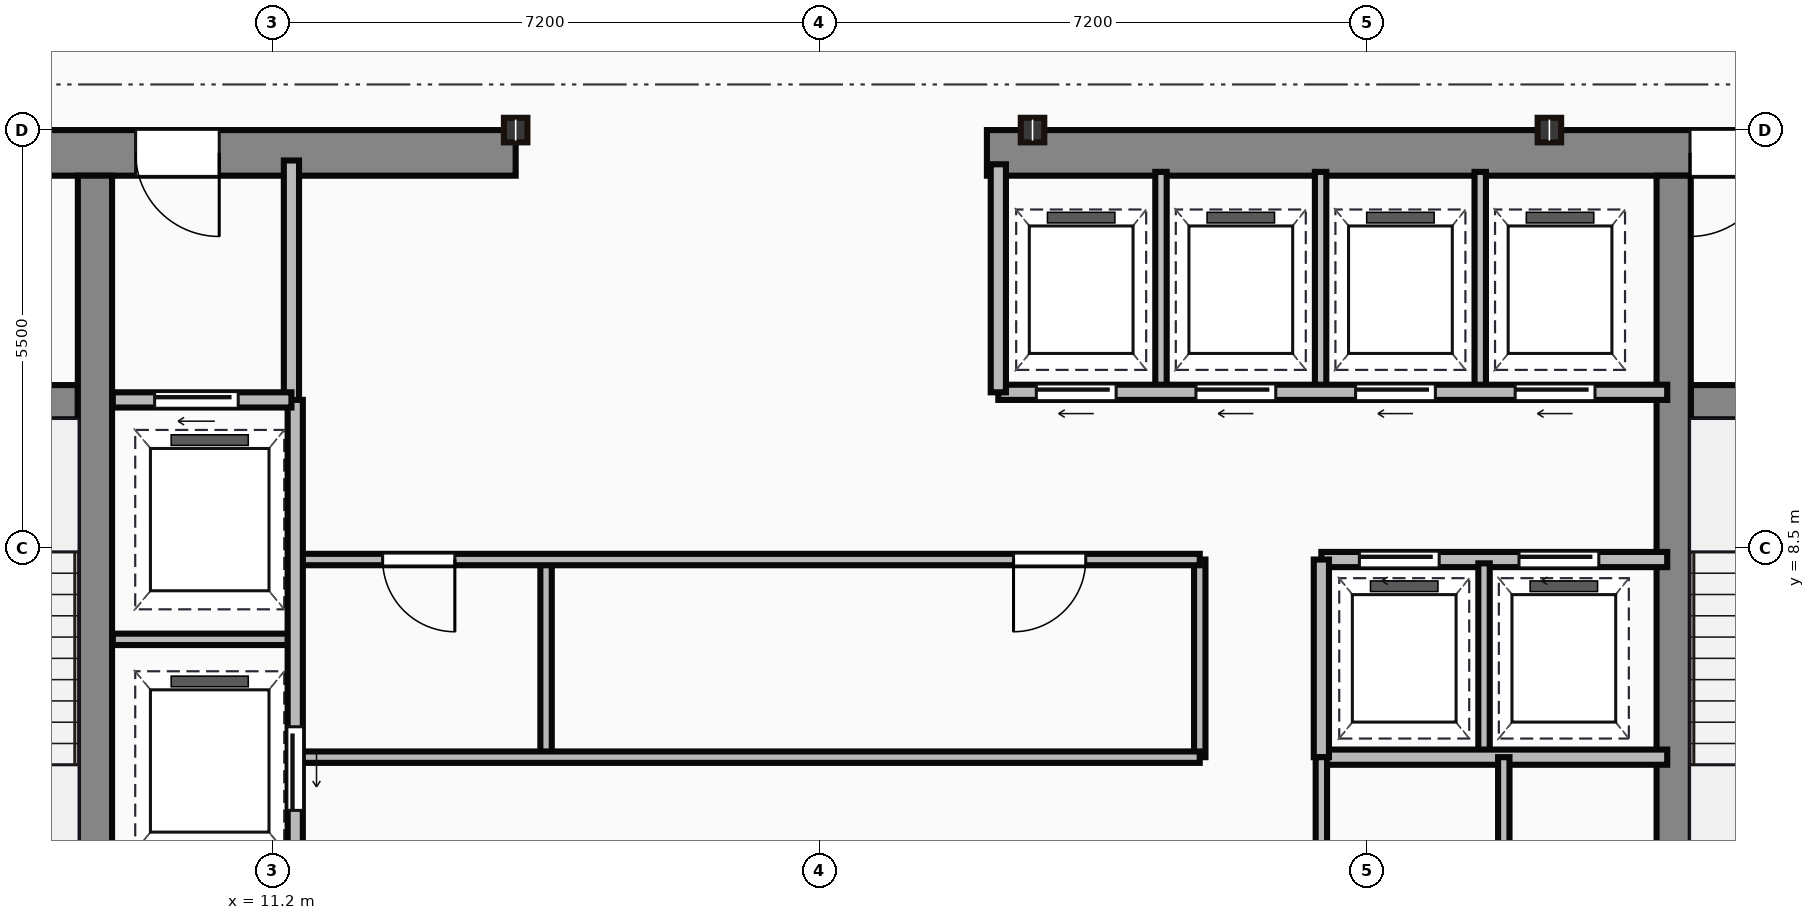
"""IFC4 building model, lengths in metres.
Left out: names, types, materials, properties, quantities, classifications, styles, units other than length and angle.
Written with IfcOpenShell. Run it as: python <this file> out.ifc"""

import sys

from ifc_helpers import new_model, si_unit, direction, frame, frame_2d, origin, origin_2d, place, context, subcontext, project, spatial, rectangle, i_section, extrude, source, transform, mapped, element, fill, save


model = new_model("IFC4")
c1 = context("Model", 3, precision=1e-05, world=origin(), true_north=direction((0.0, 1.0)))
c2 = subcontext(c1, "Body", "Model", "MODEL_VIEW")
j1 = project(units=[si_unit("LENGTHUNIT", "METRE"), si_unit("PLANEANGLEUNIT", "RADIAN")], contexts=[c1])
p1 = place(None, origin())
s1 = spatial("IfcSite", under=j1, at=p1, CompositionType="ELEMENT")
p2 = place(p1, origin())
s2 = spatial("IfcBuilding", under=s1, at=p2, CompositionType="ELEMENT")
p3 = place(p2, frame((0.0, 0.0, 284.35)))
s3 = spatial("IfcBuildingStorey", under=s2, at=p3, CompositionType="ELEMENT", Elevation=284.35)
m1 = source(origin(), c2, "Body", "SweptSolid", [
    extrude(rectangle(XDim=9.1, YDim=0.6, at=frame_2d((4.55, 0.0))), origin(), (0.0, 0.0, 1.0), 3.65),
])
p4 = place(p3, frame((5.3, 13.7, 0.0), z_axis=(0.0, 0.0, 1.0), x_axis=(1.0, 0.0, 0.0)))
e1 = element("IfcWall", 1, at=p4, inside=s3, PredefinedType="SHEAR", context=c2, shape_type="MappedRepresentation", body=[
    mapped(m1, transform((0.0, 0.0, 0.0))),
])
p5 = place(p4, frame((4.1, 0.0, 0.0)))
e2 = element("IfcOpeningElement", 2, at=p5, cuts=e1, PredefinedType="OPENING", context=c2, shape_type="SweptSolid", body=[
    extrude(rectangle(XDim=1.1, YDim=2.15, at=frame_2d((0.55, 1.075))), frame((0.0, 0.31, 0.0), z_axis=(0.0, -1.0, 0.0), x_axis=(1.0, 0.0, 0.0)), (0.0, 0.0, 1.0), 0.62),
])
m2 = source(origin(), c2, "Body", "SweptSolid", [
    extrude(rectangle(XDim=12.6, YDim=0.6, at=frame_2d((6.3, 0.0))), origin(), (0.0, 0.0, 1.0), 3.65),
])
p6 = place(p3, frame((20.6, 13.7, 0.0), z_axis=(0.0, 0.0, 1.0), x_axis=(1.0, 0.0, 0.0)))
e3 = element("IfcWall", 3, at=p6, inside=s3, PredefinedType="SHEAR", context=c2, shape_type="MappedRepresentation", body=[
    mapped(m2, transform((0.0, 0.0, 0.0))),
])
p7 = place(p6, frame((9.25, 0.0, 0.0)))
e4 = element("IfcOpeningElement", 4, at=p7, cuts=e3, PredefinedType="OPENING", context=c2, shape_type="SweptSolid", body=[
    extrude(rectangle(XDim=1.1, YDim=2.15, at=frame_2d((0.55, 1.075))), frame((0.0, 0.31, 0.0), z_axis=(0.0, -1.0, 0.0), x_axis=(1.0, 0.0, 0.0)), (0.0, 0.0, 1.0), 0.62),
])
m3 = source(origin(), c2, "Body", "SweptSolid", [
    extrude(rectangle(XDim=12.5, YDim=0.45, at=frame_2d((6.25, 0.0))), origin(), (0.0, 0.0, 1.0), 3.65),
])
for number, where, z_axis, x_axis in (
    (5, (8.865, 0.9, 0.0), (0.0, 0.0, 1.0), (0.0, 1.0, 0.0)),
    (6, (29.635, 0.9, 0.0), (0.0, 0.0, 1.0), (0.0, 1.0, 0.0)),
):
    element("IfcWall", number, at=place(p3, frame(where, z_axis=z_axis, x_axis=x_axis)), inside=s3, PredefinedType="SHEAR", context=c2, shape_type="MappedRepresentation", body=[
        mapped(m3, transform((0.0, 0.0, 0.0))),
    ])
m4 = source(origin(), c2, "Body", "SweptSolid", [
    extrude(rectangle(XDim=3.39, YDim=0.45, at=frame_2d((1.695, 0.0))), origin(), (0.0, 0.0, 1.0), 3.65),
])
p8 = place(p3, frame((5.25, 10.42, 0.0), z_axis=(0.0, 0.0, 1.0), x_axis=(1.0, 0.0, 0.0)))
e7 = element("IfcWall", 7, at=p8, inside=s3, PredefinedType="SHEAR", context=c2, shape_type="MappedRepresentation", body=[
    mapped(m4, transform((0.0, 0.0, 0.0))),
])
p9 = place(p8, frame((1.05, 0.0, 0.0)))
e8 = element("IfcOpeningElement", 8, at=p9, cuts=e7, PredefinedType="OPENING", context=c2, shape_type="SweptSolid", body=[
    extrude(rectangle(XDim=1.1, YDim=2.15, at=frame_2d((0.55, 1.075))), frame((0.0, 0.235, 0.0), z_axis=(0.0, -1.0, 0.0), x_axis=(1.0, 0.0, 0.0)), (0.0, 0.0, 1.0), 0.47),
])
p10 = place(p3, frame((29.86, 10.42, 0.0), z_axis=(0.0, 0.0, 1.0), x_axis=(1.0, 0.0, 0.0)))
e9 = element("IfcWall", 9, at=p10, inside=s3, PredefinedType="SHEAR", context=c2, shape_type="MappedRepresentation", body=[
    mapped(m4, transform((0.0, 0.0, 0.0))),
])
p11 = place(p10, frame((1.1, 0.0, 0.0)))
e10 = element("IfcOpeningElement", 10, at=p11, cuts=e9, PredefinedType="OPENING", context=c2, shape_type="SweptSolid", body=[
    extrude(rectangle(XDim=1.1, YDim=2.15, at=frame_2d((0.55, 1.075))), frame((0.0, 0.235, 0.0), z_axis=(0.0, -1.0, 0.0), x_axis=(1.0, 0.0, 0.0)), (0.0, 0.0, 1.0), 0.47),
])
m5 = source(origin(), c2, "Body", "SweptSolid", [
    extrude(i_section(OverallWidth=0.309, OverallDepth=0.323, WebThickness=0.014, FlangeThickness=0.023, at=origin_2d()), origin(), (0.0, 0.0, 1.0), 3.65),
])
for number, where, z_axis, x_axis in (
    (11, (14.4, 14.0, 0.0), (0.0, 0.0, 1.0), (1.0, 0.0, 0.0)),
    (12, (21.2, 14.0, 0.0), (0.0, 0.0, 1.0), (1.0, 0.0, 0.0)),
    (13, (28.0, 14.0, 0.0), (0.0, 0.0, 1.0), (1.0, 0.0, 0.0)),
):
    element("IfcColumn", number, at=place(p3, frame(where, z_axis=z_axis, x_axis=x_axis)), inside=s3, PredefinedType="COLUMN", context=c2, shape_type="MappedRepresentation", body=[
        mapped(m5, transform((0.0, 0.0, 0.0))),
    ])
m6 = source(origin(), c2, "Body", "SweptSolid", [
    extrude(rectangle(XDim=3.18, YDim=0.2, at=frame_2d((1.59, 0.0))), origin(), (0.0, 0.0, 1.0), 3.4),
])
p12 = place(p3, frame((11.45, 10.42, 0.0), z_axis=(0.0, 0.0, 1.0), x_axis=(0.0, 1.0, 0.0)))
e14 = element("IfcWall", 14, at=p12, inside=s3, PredefinedType="PARTITIONING", context=c2, shape_type="MappedRepresentation", body=[
    mapped(m6, transform((0.0, 0.0, 0.0))),
])
m7 = source(origin(), c2, "Body", "SweptSolid", [
    extrude(rectangle(XDim=2.35, YDim=0.2, at=frame_2d((1.175, 0.0))), origin(), (0.0, 0.0, 1.0), 3.4),
])
p13 = place(p3, frame((9.1, 10.45, 0.0), z_axis=(0.0, 0.0, 1.0), x_axis=(1.0, 0.0, 0.0)))
e15 = element("IfcWall", 15, at=p13, inside=s3, PredefinedType="PARTITIONING", context=c2, shape_type="MappedRepresentation", body=[
    mapped(m7, transform((0.0, 0.0, 0.0))),
])
p14 = place(p13, frame((0.55, 0.0, 0.0)))
e16 = element("IfcOpeningElement", 16, at=p14, cuts=e15, PredefinedType="OPENING", context=c2, shape_type="SweptSolid", body=[
    extrude(rectangle(XDim=1.1, YDim=2.15, at=frame_2d((0.55, 1.075))), frame((0.0, 0.11, 0.0), z_axis=(0.0, -1.0, 0.0), x_axis=(1.0, 0.0, 0.0)), (0.0, 0.0, 1.0), 0.22),
])
m8 = source(origin(), c2, "Body", "SweptSolid", [
    extrude(rectangle(XDim=9.6, YDim=0.2, at=frame_2d((4.8, 0.0))), origin(), (0.0, 0.0, 1.0), 3.4),
])
p15 = place(p3, frame((11.5, 0.85, 0.0), z_axis=(0.0, 0.0, 1.0), x_axis=(0.0, 1.0, 0.0)))
e17 = element("IfcWall", 17, at=p15, inside=s3, PredefinedType="PARTITIONING", context=c2, shape_type="MappedRepresentation", body=[
    mapped(m8, transform((0.0, 0.0, 0.0))),
])
p16 = place(p15, frame((4.2, 0.0, 0.0)))
e18 = element("IfcOpeningElement", 18, at=p16, cuts=e17, PredefinedType="OPENING", context=c2, shape_type="SweptSolid", body=[
    extrude(rectangle(XDim=1.1, YDim=2.15, at=frame_2d((0.55, 1.075))), frame((0.0, 0.11, 0.0), z_axis=(0.0, -1.0, 0.0), x_axis=(1.0, 0.0, 0.0)), (0.0, 0.0, 1.0), 0.22),
])
p17 = place(p15, frame((0.9, 0.0, 0.0)))
e19 = element("IfcOpeningElement", 19, at=p17, cuts=e17, PredefinedType="OPENING", context=c2, shape_type="SweptSolid", body=[
    extrude(rectangle(XDim=1.2, YDim=2.15, at=frame_2d((0.6, 1.075))), frame((0.0, 0.11, 0.0), z_axis=(0.0, -1.0, 0.0), x_axis=(1.0, 0.0, 0.0)), (0.0, 0.0, 1.0), 0.22),
])
m9 = source(origin(), c2, "Body", "SweptSolid", [
    extrude(rectangle(XDim=2.4, YDim=0.15, at=frame_2d((1.2, 0.0))), origin(), (0.0, 0.0, 1.0), 3.4),
])
p18 = place(p3, frame((9.1, 7.3, 0.0), z_axis=(0.0, 0.0, 1.0), x_axis=(1.0, 0.0, 0.0)))
e20 = element("IfcWall", 20, at=p18, inside=s3, PredefinedType="PARTITIONING", context=c2, shape_type="MappedRepresentation", body=[
    mapped(m9, transform((0.0, 0.0, 0.0))),
])
m10 = source(origin(), c2, "Body", "SweptSolid", [
    extrude(rectangle(XDim=11.85, YDim=0.15, at=frame_2d((5.925, 0.0))), origin(), (0.0, 0.0, 1.0), 3.4),
])
p19 = place(p3, frame((11.55, 5.75, 0.0), z_axis=(0.0, 0.0, 1.0), x_axis=(1.0, 0.0, 0.0)))
e21 = element("IfcWall", 21, at=p19, inside=s3, PredefinedType="PARTITIONING", context=c2, shape_type="MappedRepresentation", body=[
    mapped(m10, transform((0.0, 0.0, 0.0))),
])
p20 = place(p3, frame((11.55, 8.35, 0.0), z_axis=(0.0, 0.0, 1.0), x_axis=(1.0, 0.0, 0.0)))
e22 = element("IfcWall", 22, at=p20, inside=s3, PredefinedType="PARTITIONING", context=c2, shape_type="MappedRepresentation", body=[
    mapped(m10, transform((0.0, 0.0, 0.0))),
])
p21 = place(p20, frame((1.1, 0.0, 0.0)))
e23 = element("IfcOpeningElement", 23, at=p21, cuts=e22, PredefinedType="OPENING", context=c2, shape_type="SweptSolid", body=[
    extrude(rectangle(XDim=0.95, YDim=2.15, at=frame_2d((0.475, 1.075))), frame((0.0, 0.085, 0.0), z_axis=(0.0, -1.0, 0.0), x_axis=(1.0, 0.0, 0.0)), (0.0, 0.0, 1.0), 0.17),
])
p22 = place(p20, frame((9.4, 0.0, 0.0)))
e24 = element("IfcOpeningElement", 24, at=p22, cuts=e22, PredefinedType="OPENING", context=c2, shape_type="SweptSolid", body=[
    extrude(rectangle(XDim=0.95, YDim=2.15, at=frame_2d((0.475, 1.075))), frame((0.0, 0.085, 0.0), z_axis=(0.0, -1.0, 0.0), x_axis=(1.0, 0.0, 0.0)), (0.0, 0.0, 1.0), 0.17),
])
m11 = source(origin(), c2, "Body", "SweptSolid", [
    extrude(rectangle(XDim=2.6, YDim=0.15, at=frame_2d((1.3, 0.0))), origin(), (0.0, 0.0, 1.0), 3.4),
])
p23 = place(p3, frame((23.4, 5.75, 0.0), z_axis=(0.0, 0.0, 1.0), x_axis=(0.0, 1.0, 0.0)))
e25 = element("IfcWall", 25, at=p23, inside=s3, PredefinedType="PARTITIONING", context=c2, shape_type="MappedRepresentation", body=[
    mapped(m11, transform((0.0, 0.0, 0.0))),
])
m12 = source(origin(), c2, "Body", "SweptSolid", [
    extrude(rectangle(XDim=2.5, YDim=0.15, at=frame_2d((1.25, 0.0))), origin(), (0.0, 0.0, 1.0), 3.4),
])
p24 = place(p3, frame((14.8, 5.8, 0.0), z_axis=(0.0, 0.0, 1.0), x_axis=(0.0, 1.0, 0.0)))
e26 = element("IfcWall", 26, at=p24, inside=s3, PredefinedType="PARTITIONING", context=c2, shape_type="MappedRepresentation", body=[
    mapped(m12, transform((0.0, 0.0, 0.0))),
])
m13 = source(origin(), c2, "Body", "SweptSolid", [
    extrude(rectangle(XDim=8.8, YDim=0.2, at=frame_2d((4.4, 0.0))), origin(), (0.0, 0.0, 1.0), 3.4),
])
p25 = place(p3, frame((20.75, 10.55, 0.0), z_axis=(0.0, 0.0, 1.0), x_axis=(1.0, 0.0, 0.0)))
e27 = element("IfcWall", 27, at=p25, inside=s3, PredefinedType="PARTITIONING", context=c2, shape_type="MappedRepresentation", body=[
    mapped(m13, transform((0.0, 0.0, 0.0))),
])
p26 = place(p25, frame((0.5, 0.0, 0.0)))
e28 = element("IfcOpeningElement", 28, at=p26, cuts=e27, PredefinedType="OPENING", context=c2, shape_type="SweptSolid", body=[
    extrude(rectangle(XDim=1.05, YDim=2.15, at=frame_2d((0.525, 1.075))), frame((0.0, 0.11, 0.0), z_axis=(0.0, -1.0, 0.0), x_axis=(1.0, 0.0, 0.0)), (0.0, 0.0, 1.0), 0.22),
])
p27 = place(p25, frame((2.6, 0.0, 0.0)))
e29 = element("IfcOpeningElement", 29, at=p27, cuts=e27, PredefinedType="OPENING", context=c2, shape_type="SweptSolid", body=[
    extrude(rectangle(XDim=1.05, YDim=2.15, at=frame_2d((0.525, 1.075))), frame((0.0, 0.11, 0.0), z_axis=(0.0, -1.0, 0.0), x_axis=(1.0, 0.0, 0.0)), (0.0, 0.0, 1.0), 0.22),
])
p28 = place(p25, frame((4.7, 0.0, 0.0)))
e30 = element("IfcOpeningElement", 30, at=p28, cuts=e27, PredefinedType="OPENING", context=c2, shape_type="SweptSolid", body=[
    extrude(rectangle(XDim=1.05, YDim=2.15, at=frame_2d((0.525, 1.075))), frame((0.0, 0.11, 0.0), z_axis=(0.0, -1.0, 0.0), x_axis=(1.0, 0.0, 0.0)), (0.0, 0.0, 1.0), 0.22),
])
p29 = place(p25, frame((6.8, 0.0, 0.0)))
e31 = element("IfcOpeningElement", 31, at=p29, cuts=e27, PredefinedType="OPENING", context=c2, shape_type="SweptSolid", body=[
    extrude(rectangle(XDim=1.05, YDim=2.15, at=frame_2d((0.525, 1.075))), frame((0.0, 0.11, 0.0), z_axis=(0.0, -1.0, 0.0), x_axis=(1.0, 0.0, 0.0)), (0.0, 0.0, 1.0), 0.22),
])
m14 = source(origin(), c2, "Body", "SweptSolid", [
    extrude(rectangle(XDim=3.0, YDim=0.2, at=frame_2d((1.5, 0.0))), origin(), (0.0, 0.0, 1.0), 3.4),
])
p30 = place(p3, frame((20.75, 10.55, 0.0), z_axis=(0.0, 0.0, 1.0), x_axis=(0.0, 1.0, 0.0)))
e32 = element("IfcWall", 32, at=p30, inside=s3, PredefinedType="PARTITIONING", context=c2, shape_type="MappedRepresentation", body=[
    mapped(m14, transform((0.0, 0.0, 0.0))),
])
m15 = source(origin(), c2, "Body", "SweptSolid", [
    extrude(rectangle(XDim=2.85, YDim=0.15, at=frame_2d((1.425, 0.0))), origin(), (0.0, 0.0, 1.0), 3.4),
])
for number, where, z_axis, x_axis in (
    (33, (22.89, 10.6, 0.0), (0.0, 0.0, 1.0), (0.0, 1.0, 0.0)),
    (34, (24.99, 10.6, 0.0), (0.0, 0.0, 1.0), (0.0, 1.0, 0.0)),
    (35, (27.09, 10.6, 0.0), (0.0, 0.0, 1.0), (0.0, 1.0, 0.0)),
):
    element("IfcWall", number, at=place(p3, frame(where, z_axis=z_axis, x_axis=x_axis)), inside=s3, PredefinedType="PARTITIONING", context=c2, shape_type="MappedRepresentation", body=[
        mapped(m15, transform((0.0, 0.0, 0.0))),
    ])
m16 = source(origin(), c2, "Body", "SweptSolid", [
    extrude(rectangle(XDim=4.55, YDim=0.2, at=frame_2d((2.275, 0.0))), origin(), (0.0, 0.0, 1.0), 3.4),
])
p31 = place(p3, frame((25.0, 8.35, 0.0), z_axis=(0.0, 0.0, 1.0), x_axis=(1.0, 0.0, 0.0)))
e36 = element("IfcWall", 36, at=p31, inside=s3, PredefinedType="PARTITIONING", context=c2, shape_type="MappedRepresentation", body=[
    mapped(m16, transform((0.0, 0.0, 0.0))),
])
p32 = place(p31, frame((0.5, 0.0, 0.0)))
e37 = element("IfcOpeningElement", 37, at=p32, cuts=e36, PredefinedType="OPENING", context=c2, shape_type="SweptSolid", body=[
    extrude(rectangle(XDim=1.05, YDim=2.15, at=frame_2d((0.525, 1.075))), frame((0.0, 0.11, 0.0), z_axis=(0.0, -1.0, 0.0), x_axis=(1.0, 0.0, 0.0)), (0.0, 0.0, 1.0), 0.22),
])
p33 = place(p31, frame((2.6, 0.0, 0.0)))
e38 = element("IfcOpeningElement", 38, at=p33, cuts=e36, PredefinedType="OPENING", context=c2, shape_type="SweptSolid", body=[
    extrude(rectangle(XDim=1.05, YDim=2.15, at=frame_2d((0.525, 1.075))), frame((0.0, 0.11, 0.0), z_axis=(0.0, -1.0, 0.0), x_axis=(1.0, 0.0, 0.0)), (0.0, 0.0, 1.0), 0.22),
])
p34 = place(p3, frame((25.0, 5.75, 0.0), z_axis=(0.0, 0.0, 1.0), x_axis=(1.0, 0.0, 0.0)))
e39 = element("IfcWall", 39, at=p34, inside=s3, PredefinedType="PARTITIONING", context=c2, shape_type="MappedRepresentation", body=[
    mapped(m16, transform((0.0, 0.0, 0.0))),
])
m17 = source(origin(), c2, "Body", "SweptSolid", [
    extrude(rectangle(XDim=2.6, YDim=0.2, at=frame_2d((1.3, 0.0))), origin(), (0.0, 0.0, 1.0), 3.4),
])
p35 = place(p3, frame((25.0, 5.75, 0.0), z_axis=(0.0, 0.0, 1.0), x_axis=(0.0, 1.0, 0.0)))
e40 = element("IfcWall", 40, at=p35, inside=s3, PredefinedType="PARTITIONING", context=c2, shape_type="MappedRepresentation", body=[
    mapped(m17, transform((0.0, 0.0, 0.0))),
])
p36 = place(p3, frame((27.14, 5.8, 0.0), z_axis=(0.0, 0.0, 1.0), x_axis=(0.0, 1.0, 0.0)))
e41 = element("IfcWall", 41, at=p36, inside=s3, PredefinedType="PARTITIONING", context=c2, shape_type="MappedRepresentation", body=[
    mapped(m12, transform((0.0, 0.0, 0.0))),
])
m18 = source(origin(), c2, "Body", "SweptSolid", [
    extrude(rectangle(XDim=4.9, YDim=0.15, at=frame_2d((2.45, 0.0))), origin(), (0.0, 0.0, 1.0), 3.4),
])
p37 = place(p3, frame((25.0, 0.85, 0.0), z_axis=(0.0, 0.0, 1.0), x_axis=(0.0, 1.0, 0.0)))
e42 = element("IfcWall", 42, at=p37, inside=s3, PredefinedType="PARTITIONING", context=c2, shape_type="MappedRepresentation", body=[
    mapped(m18, transform((0.0, 0.0, 0.0))),
])
p38 = place(p37, frame((2.5, 0.0, 0.0)))
e43 = element("IfcOpeningElement", 43, at=p38, cuts=e42, PredefinedType="OPENING", context=c2, shape_type="SweptSolid", body=[
    extrude(rectangle(XDim=0.95, YDim=2.15, at=frame_2d((0.475, 1.075))), frame((0.0, 0.085, 0.0), z_axis=(0.0, -1.0, 0.0), x_axis=(1.0, 0.0, 0.0)), (0.0, 0.0, 1.0), 0.17),
])
m19 = source(origin(), c2, "Body", "SweptSolid", [
    extrude(rectangle(XDim=3.4, YDim=0.15, at=frame_2d((1.7, 0.0))), origin(), (0.0, 0.0, 1.0), 3.4),
])
p39 = place(p3, frame((27.4, 2.35, 0.0), z_axis=(0.0, 0.0, 1.0), x_axis=(0.0, 1.0, 0.0)))
e44 = element("IfcWall", 44, at=p39, inside=s3, PredefinedType="PARTITIONING", context=c2, shape_type="MappedRepresentation", body=[
    mapped(m19, transform((0.0, 0.0, 0.0))),
])
p40 = place(p39, frame((1.1, 0.0, 0.0)))
e45 = element("IfcOpeningElement", 45, at=p40, cuts=e44, PredefinedType="OPENING", context=c2, shape_type="SweptSolid", body=[
    extrude(rectangle(XDim=0.85, YDim=2.1, at=frame_2d((0.425, 1.05))), frame((0.0, 0.085, 0.0), z_axis=(0.0, -1.0, 0.0), x_axis=(1.0, 0.0, 0.0)), (0.0, 0.0, 1.0), 0.17),
])
m20 = source(origin(), c2, "Body", "SweptSolid", [
    extrude(rectangle(XDim=1.1, YDim=2.15, at=frame_2d((0.55, 1.075))), frame((0.0, 0.025, 0.0), z_axis=(0.0, -1.0, 0.0), x_axis=(1.0, 0.0, 0.0)), (0.0, 0.0, 1.0), 0.05),
])
p41 = place(p5, origin())
e46 = element("IfcDoor", 46, at=p41, inside=s3, OperationType="SINGLE_SWING_RIGHT", PredefinedType="DOOR", context=c2, shape_type="MappedRepresentation", body=[
    mapped(m20, transform((0.0, 0.0, 0.0))),
])
fill(e2, e46)
p42 = place(p7, origin())
e47 = element("IfcDoor", 47, at=p42, inside=s3, OperationType="SINGLE_SWING_LEFT", PredefinedType="DOOR", context=c2, shape_type="MappedRepresentation", body=[
    mapped(m20, transform((0.0, 0.0, 0.0))),
])
fill(e4, e47)
p43 = place(p14, origin())
e48 = element("IfcDoor", 48, at=p43, inside=s3, OperationType="SLIDING_TO_LEFT", PredefinedType="DOOR", context=c2, shape_type="MappedRepresentation", body=[
    mapped(m20, transform((0.0, 0.0, 0.0))),
])
fill(e16, e48)
p44 = place(p16, frame((1.1, 0.0, 0.0), z_axis=(0.0, 0.0, 1.0), x_axis=(-1.0, 0.0, 0.0)))
e49 = element("IfcDoor", 49, at=p44, inside=s3, OperationType="SLIDING_TO_LEFT", PredefinedType="DOOR", context=c2, shape_type="MappedRepresentation", body=[
    mapped(m20, transform((0.0, 0.0, 0.0))),
])
fill(e18, e49)
m21 = source(origin(), c2, "Body", "SweptSolid", [
    extrude(rectangle(XDim=0.95, YDim=2.15, at=frame_2d((0.475, 1.075))), frame((0.0, 0.025, 0.0), z_axis=(0.0, -1.0, 0.0), x_axis=(1.0, 0.0, 0.0)), (0.0, 0.0, 1.0), 0.05),
])
p45 = place(p21, origin())
e50 = element("IfcDoor", 50, at=p45, inside=s3, OperationType="SINGLE_SWING_RIGHT", PredefinedType="DOOR", context=c2, shape_type="MappedRepresentation", body=[
    mapped(m21, transform((0.0, 0.0, 0.0))),
])
fill(e23, e50)
p46 = place(p22, origin())
e51 = element("IfcDoor", 51, at=p46, inside=s3, OperationType="SINGLE_SWING_LEFT", PredefinedType="DOOR", context=c2, shape_type="MappedRepresentation", body=[
    mapped(m21, transform((0.0, 0.0, 0.0))),
])
fill(e24, e51)
m22 = source(origin(), c2, "Body", "SweptSolid", [
    extrude(rectangle(XDim=1.05, YDim=2.15, at=frame_2d((0.525, 1.075))), frame((0.0, 0.025, 0.0), z_axis=(0.0, -1.0, 0.0), x_axis=(1.0, 0.0, 0.0)), (0.0, 0.0, 1.0), 0.05),
])
p47 = place(p26, frame((1.05, 0.0, 0.0), z_axis=(0.0, 0.0, 1.0), x_axis=(-1.0, 0.0, 0.0)))
e52 = element("IfcDoor", 52, at=p47, inside=s3, OperationType="SLIDING_TO_LEFT", PredefinedType="DOOR", context=c2, shape_type="MappedRepresentation", body=[
    mapped(m22, transform((0.0, 0.0, 0.0))),
])
fill(e28, e52)
p48 = place(p27, frame((1.05, 0.0, 0.0), z_axis=(0.0, 0.0, 1.0), x_axis=(-1.0, 0.0, 0.0)))
e53 = element("IfcDoor", 53, at=p48, inside=s3, OperationType="SLIDING_TO_LEFT", PredefinedType="DOOR", context=c2, shape_type="MappedRepresentation", body=[
    mapped(m22, transform((0.0, 0.0, 0.0))),
])
fill(e29, e53)
p49 = place(p28, frame((1.05, 0.0, 0.0), z_axis=(0.0, 0.0, 1.0), x_axis=(-1.0, 0.0, 0.0)))
e54 = element("IfcDoor", 54, at=p49, inside=s3, OperationType="SLIDING_TO_LEFT", PredefinedType="DOOR", context=c2, shape_type="MappedRepresentation", body=[
    mapped(m22, transform((0.0, 0.0, 0.0))),
])
fill(e30, e54)
p50 = place(p29, frame((1.05, 0.0, 0.0), z_axis=(0.0, 0.0, 1.0), x_axis=(-1.0, 0.0, 0.0)))
e55 = element("IfcDoor", 55, at=p50, inside=s3, OperationType="SLIDING_TO_LEFT", PredefinedType="DOOR", context=c2, shape_type="MappedRepresentation", body=[
    mapped(m22, transform((0.0, 0.0, 0.0))),
])
fill(e31, e55)
p51 = place(p32, origin())
e56 = element("IfcDoor", 56, at=p51, inside=s3, OperationType="SLIDING_TO_LEFT", PredefinedType="DOOR", context=c2, shape_type="MappedRepresentation", body=[
    mapped(m22, transform((0.0, 0.0, 0.0))),
])
fill(e37, e56)
p52 = place(p33, origin())
e57 = element("IfcDoor", 57, at=p52, inside=s3, OperationType="SLIDING_TO_LEFT", PredefinedType="DOOR", context=c2, shape_type="MappedRepresentation", body=[
    mapped(m22, transform((0.0, 0.0, 0.0))),
])
fill(e38, e57)
save(model, sys.argv[1])
